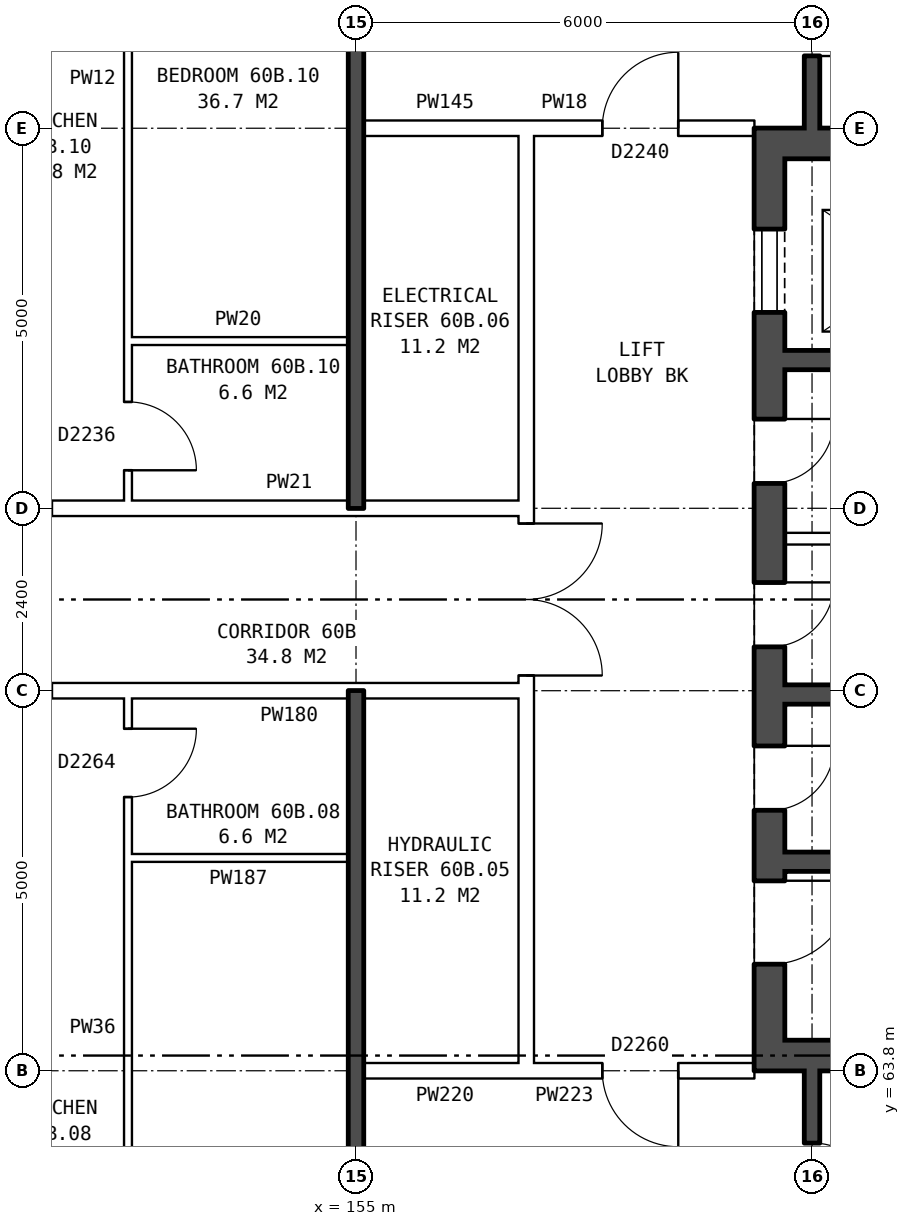
"""IFC4 building model, lengths in metres.
Left out: names, types, materials, properties, quantities, classifications, styles, units other than length and angle.
Written with IfcOpenShell. Run it as: python <this file> out.ifc"""

import sys

from ifc_helpers import new_model, si_unit, direction, frame, frame_2d, origin, place, context, subcontext, project, spatial, rectangle, extrude, element, fill, save


model = new_model("IFC4")
c1 = context("Model", 3, precision=1e-05, world=origin(), true_north=direction((0.0, 1.0)))
c2 = subcontext(c1, "Body", "Model", "MODEL_VIEW")
j1 = project(units=[si_unit("LENGTHUNIT", "METRE"), si_unit("PLANEANGLEUNIT", "RADIAN")], contexts=[c1])
p1 = place(None, origin())
s1 = spatial("IfcSite", under=j1, at=p1, CompositionType="ELEMENT")
p2 = place(p1, origin())
s2 = spatial("IfcBuilding", under=s1, at=p2, CompositionType="ELEMENT")
p3 = place(p2, frame((0.0, 0.0, 212.1)))
s3 = spatial("IfcBuildingStorey", under=s2, at=p3, CompositionType="ELEMENT", Elevation=212.1)
p4 = place(p3, frame((160.44, 76.2, 0.0), z_axis=(0.0, 0.0, 1.0), x_axis=(0.0, -1.0, 0.0)))
e1 = element("IfcWall", 1, at=p4, inside=s3, PredefinedType="SHEAR", context=c2, shape_type="SweptSolid", body=[
    extrude(rectangle(XDim=12.4, YDim=0.4, at=frame_2d((6.2, 0.0))), origin(), (0.0, 0.0, 1.0), 2.85),
])
p5 = place(p4, frame((1.325, 0.0, 0.0)))
e2 = element("IfcOpeningElement", 2, at=p5, cuts=e1, PredefinedType="OPENING", context=c2, shape_type="SweptSolid", body=[
    extrude(rectangle(XDim=1.1, YDim=2.1, at=frame_2d((0.55, 1.05))), frame((0.0, 0.21, 0.0), z_axis=(0.0, -1.0, 0.0), x_axis=(1.0, 0.0, 0.0)), (0.0, 0.0, 1.0), 0.42),
])
p6 = place(p4, frame((3.825, 0.0, 0.0)))
e3 = element("IfcOpeningElement", 3, at=p6, cuts=e1, PredefinedType="OPENING", context=c2, shape_type="SweptSolid", body=[
    extrude(rectangle(XDim=0.85, YDim=2.1, at=frame_2d((0.425, 1.05))), frame((0.0, 0.21, 0.0), z_axis=(0.0, -1.0, 0.0), x_axis=(1.0, 0.0, 0.0)), (0.0, 0.0, 1.0), 0.42),
])
p7 = place(p4, frame((5.975, 0.0, 0.0)))
e4 = element("IfcOpeningElement", 4, at=p7, cuts=e1, PredefinedType="OPENING", context=c2, shape_type="SweptSolid", body=[
    extrude(rectangle(XDim=0.85, YDim=2.1, at=frame_2d((0.425, 1.05))), frame((0.0, 0.21, 0.0), z_axis=(0.0, -1.0, 0.0), x_axis=(1.0, 0.0, 0.0)), (0.0, 0.0, 1.0), 0.42),
])
p8 = place(p4, frame((9.9, 0.0, 0.0)))
e5 = element("IfcOpeningElement", 5, at=p8, cuts=e1, PredefinedType="OPENING", context=c2, shape_type="SweptSolid", body=[
    extrude(rectangle(XDim=1.1, YDim=2.1, at=frame_2d((0.55, 1.05))), frame((0.0, 0.21, 0.0), z_axis=(0.0, -1.0, 0.0), x_axis=(1.0, 0.0, 0.0)), (0.0, 0.0, 1.0), 0.42),
])
p9 = place(p4, frame((8.125, 0.0, 0.0)))
e6 = element("IfcOpeningElement", 6, at=p9, cuts=e1, PredefinedType="OPENING", context=c2, shape_type="SweptSolid", body=[
    extrude(rectangle(XDim=0.85, YDim=2.1, at=frame_2d((0.425, 1.05))), frame((0.0, 0.21, 0.0), z_axis=(0.0, -1.0, 0.0), x_axis=(1.0, 0.0, 0.0)), (0.0, 0.0, 1.0), 0.42),
])
for number, where, z_axis, x_axis in (
    (7, (160.64, 76.0, 0.0), (0.0, 0.0, 1.0), (1.0, 0.0, 0.0)),
    (8, (160.64, 64.0, 0.0), (0.0, 0.0, 1.0), (1.0, 0.0, 0.0)),
):
    element("IfcWall", number, at=place(p3, frame(where, z_axis=z_axis, x_axis=x_axis)), inside=s3, PredefinedType="SHEAR", context=c2, shape_type="SweptSolid", body=[
        extrude(rectangle(XDim=7.6, YDim=0.4, at=frame_2d((3.8, 0.0))), origin(), (0.0, 0.0, 1.0), 2.85),
    ])
p10 = place(p3, frame((160.64, 73.15, 0.0), z_axis=(0.0, 0.0, 1.0), x_axis=(1.0, 0.0, 0.0)))
e9 = element("IfcWall", 9, at=p10, inside=s3, PredefinedType="SHEAR", context=c2, shape_type="SweptSolid", body=[
    extrude(rectangle(XDim=4.775, YDim=0.25, at=frame_2d((2.388, 0.0))), origin(), (0.0, 0.0, 1.0), 2.85),
])
p11 = place(p3, frame((160.64, 70.8, 0.0), z_axis=(0.0, 0.0, 1.0), x_axis=(1.0, 0.0, 0.0)))
e10 = element("IfcWall", 10, at=p11, inside=s3, PredefinedType="PARTITIONING", context=c2, shape_type="SweptSolid", body=[
    extrude(rectangle(XDim=2.525, YDim=0.15, at=frame_2d((1.263, 0.0))), origin(), (0.0, 0.0, 1.0), 2.85),
])
p12 = place(p3, frame((160.64, 68.75, 0.0), z_axis=(0.0, 0.0, 1.0), x_axis=(1.0, 0.0, 0.0)))
e11 = element("IfcWall", 11, at=p12, inside=s3, PredefinedType="SHEAR", context=c2, shape_type="SweptSolid", body=[
    extrude(rectangle(XDim=7.6, YDim=0.25, at=frame_2d((3.8, 0.0))), origin(), (0.0, 0.0, 1.0), 2.85),
])
p13 = place(p12, frame((5.175, 0.0, 0.0)))
e12 = element("IfcOpeningElement", 12, at=p13, cuts=e11, PredefinedType="OPENING", context=c2, shape_type="SweptSolid", body=[
    extrude(rectangle(XDim=1.1, YDim=2.1, at=frame_2d((0.55, 1.05))), frame((0.0, 0.135, 0.0), z_axis=(0.0, -1.0, 0.0), x_axis=(1.0, 0.0, 0.0)), (0.0, 0.0, 1.0), 0.27),
])
p14 = place(p12, frame((2.975, 0.0, 0.0)))
e13 = element("IfcOpeningElement", 13, at=p14, cuts=e11, PredefinedType="OPENING", context=c2, shape_type="SweptSolid", body=[
    extrude(rectangle(XDim=0.85, YDim=2.1, at=frame_2d((0.425, 1.05))), frame((0.0, 0.135, 0.0), z_axis=(0.0, -1.0, 0.0), x_axis=(1.0, 0.0, 0.0)), (0.0, 0.0, 1.0), 0.27),
])
p15 = place(p3, frame((160.64, 66.55, 0.0), z_axis=(0.0, 0.0, 1.0), x_axis=(1.0, 0.0, 0.0)))
e14 = element("IfcWall", 14, at=p15, inside=s3, PredefinedType="SHEAR", context=c2, shape_type="SweptSolid", body=[
    extrude(rectangle(XDim=2.525, YDim=0.25, at=frame_2d((1.263, 0.0))), origin(), (0.0, 0.0, 1.0), 2.85),
])
p16 = place(p3, frame((157.24, 63.9, 0.0), z_axis=(0.0, 0.0, 1.0), x_axis=(0.0, 1.0, 0.0)))
e15 = element("IfcWall", 15, at=p16, inside=s3, PredefinedType="PARTITIONING", context=c2, shape_type="SweptSolid", body=[
    extrude(rectangle(XDim=12.2, YDim=0.2, at=frame_2d((6.1, 0.0))), origin(), (0.0, 0.0, 1.0), 2.85),
])
p17 = place(p16, frame((5.1, 0.0, 0.0)))
e16 = element("IfcOpeningElement", 16, at=p17, cuts=e15, PredefinedType="OPENING", context=c2, shape_type="SweptSolid", body=[
    extrude(rectangle(XDim=2.0, YDim=2.1, at=frame_2d((1.0, 1.05))), frame((0.0, 0.11, 0.0), z_axis=(0.0, -1.0, 0.0), x_axis=(1.0, 0.0, 0.0)), (0.0, 0.0, 1.0), 0.22),
])
p18 = place(p3, frame((155.1, 63.8, 0.0), z_axis=(0.0, 0.0, 1.0), x_axis=(1.0, 0.0, 0.0)))
e17 = element("IfcWall", 17, at=p18, inside=s3, PredefinedType="PARTITIONING", context=c2, shape_type="SweptSolid", body=[
    extrude(rectangle(XDim=2.14, YDim=0.2, at=frame_2d((1.07, 0.0))), origin(), (0.0, 0.0, 1.0), 2.85),
])
p19 = place(p3, frame((157.24, 63.8, 0.0), z_axis=(0.0, 0.0, 1.0), x_axis=(1.0, 0.0, 0.0)))
e18 = element("IfcWall", 18, at=p19, inside=s3, PredefinedType="PARTITIONING", context=c2, shape_type="SweptSolid", body=[
    extrude(rectangle(XDim=3.0, YDim=0.2, at=frame_2d((1.5, 0.0))), origin(), (0.0, 0.0, 1.0), 2.85),
])
p20 = place(p19, frame((1.0, 0.0, 0.0)))
e19 = element("IfcOpeningElement", 19, at=p20, cuts=e18, PredefinedType="OPENING", context=c2, shape_type="SweptSolid", body=[
    extrude(rectangle(XDim=1.0, YDim=2.1, at=frame_2d((0.5, 1.05))), frame((0.0, 0.11, 0.0), z_axis=(0.0, -1.0, 0.0), x_axis=(1.0, 0.0, 0.0)), (0.0, 0.0, 1.0), 0.22),
])
p21 = place(p3, frame((152.0, 66.6, 0.0), z_axis=(0.0, 0.0, 1.0), x_axis=(1.0, 0.0, 0.0)))
e20 = element("IfcWall", 20, at=p21, inside=s3, PredefinedType="PARTITIONING", context=c2, shape_type="SweptSolid", body=[
    extrude(rectangle(XDim=2.9, YDim=0.1, at=frame_2d((1.45, 0.0))), origin(), (0.0, 0.0, 1.0), 2.85),
])
p22 = place(p3, frame((142.76, 68.8, 0.0), z_axis=(0.0, 0.0, 1.0), x_axis=(1.0, 0.0, 0.0)))
e21 = element("IfcWall", 21, at=p22, inside=s3, PredefinedType="PARTITIONING", context=c2, shape_type="SweptSolid", body=[
    extrude(rectangle(XDim=14.48, YDim=0.2, at=frame_2d((7.24, 0.0))), origin(), (0.0, 0.0, 1.0), 2.85),
])
p23 = place(p22, frame((4.24, 0.0, 0.0)))
e22 = element("IfcOpeningElement", 22, at=p23, cuts=e21, PredefinedType="OPENING", context=c2, shape_type="SweptSolid", body=[
    extrude(rectangle(XDim=1.0, YDim=2.1, at=frame_2d((0.5, 1.05))), frame((0.0, 0.11, 0.0), z_axis=(0.0, -1.0, 0.0), x_axis=(1.0, 0.0, 0.0)), (0.0, 0.0, 1.0), 0.22),
])
p24 = place(p22, frame((7.24, 0.0, 0.0)))
e23 = element("IfcOpeningElement", 23, at=p24, cuts=e21, PredefinedType="OPENING", context=c2, shape_type="SweptSolid", body=[
    extrude(rectangle(XDim=1.0, YDim=2.1, at=frame_2d((0.5, 1.05))), frame((0.0, 0.11, 0.0), z_axis=(0.0, -1.0, 0.0), x_axis=(1.0, 0.0, 0.0)), (0.0, 0.0, 1.0), 0.22),
])
p25 = place(p3, frame((142.76, 71.2, 0.0), z_axis=(0.0, 0.0, 1.0), x_axis=(1.0, 0.0, 0.0)))
e24 = element("IfcWall", 24, at=p25, inside=s3, PredefinedType="PARTITIONING", context=c2, shape_type="SweptSolid", body=[
    extrude(rectangle(XDim=14.48, YDim=0.2, at=frame_2d((7.24, 0.0))), origin(), (0.0, 0.0, 1.0), 2.85),
])
p26 = place(p25, frame((4.24, 0.0, 0.0)))
e25 = element("IfcOpeningElement", 25, at=p26, cuts=e24, PredefinedType="OPENING", context=c2, shape_type="SweptSolid", body=[
    extrude(rectangle(XDim=1.0, YDim=2.1, at=frame_2d((0.5, 1.05))), frame((0.0, 0.11, 0.0), z_axis=(0.0, -1.0, 0.0), x_axis=(1.0, 0.0, 0.0)), (0.0, 0.0, 1.0), 0.22),
])
p27 = place(p25, frame((7.24, 0.0, 0.0)))
e26 = element("IfcOpeningElement", 26, at=p27, cuts=e24, PredefinedType="OPENING", context=c2, shape_type="SweptSolid", body=[
    extrude(rectangle(XDim=1.0, YDim=2.1, at=frame_2d((0.5, 1.05))), frame((0.0, 0.11, 0.0), z_axis=(0.0, -1.0, 0.0), x_axis=(1.0, 0.0, 0.0)), (0.0, 0.0, 1.0), 0.22),
])
p28 = place(p3, frame((152.0, 73.4, 0.0), z_axis=(0.0, 0.0, 1.0), x_axis=(1.0, 0.0, 0.0)))
e27 = element("IfcWall", 27, at=p28, inside=s3, PredefinedType="PARTITIONING", context=c2, shape_type="SweptSolid", body=[
    extrude(rectangle(XDim=2.9, YDim=0.1, at=frame_2d((1.45, 0.0))), origin(), (0.0, 0.0, 1.0), 2.85),
])
p29 = place(p3, frame((155.1, 76.2, 0.0), z_axis=(0.0, 0.0, 1.0), x_axis=(1.0, 0.0, 0.0)))
e28 = element("IfcWall", 28, at=p29, inside=s3, PredefinedType="PARTITIONING", context=c2, shape_type="SweptSolid", body=[
    extrude(rectangle(XDim=2.14, YDim=0.2, at=frame_2d((1.07, 0.0))), origin(), (0.0, 0.0, 1.0), 2.85),
])
p30 = place(p3, frame((157.24, 76.2, 0.0), z_axis=(0.0, 0.0, 1.0), x_axis=(1.0, 0.0, 0.0)))
e29 = element("IfcWall", 29, at=p30, inside=s3, PredefinedType="PARTITIONING", context=c2, shape_type="SweptSolid", body=[
    extrude(rectangle(XDim=3.0, YDim=0.2, at=frame_2d((1.5, 0.0))), origin(), (0.0, 0.0, 1.0), 2.85),
])
p31 = place(p30, frame((1.0, 0.0, 0.0)))
e30 = element("IfcOpeningElement", 30, at=p31, cuts=e29, PredefinedType="OPENING", context=c2, shape_type="SweptSolid", body=[
    extrude(rectangle(XDim=1.0, YDim=2.1, at=frame_2d((0.5, 1.05))), frame((0.0, 0.11, 0.0), z_axis=(0.0, -1.0, 0.0), x_axis=(1.0, 0.0, 0.0)), (0.0, 0.0, 1.0), 0.22),
])
p32 = place(p3, frame((152.0, 54.36, 0.0), z_axis=(0.0, 0.0, 1.0), x_axis=(0.0, 1.0, 0.0)))
e31 = element("IfcWall", 31, at=p32, inside=s3, PredefinedType="PARTITIONING", context=c2, shape_type="SweptSolid", body=[
    extrude(rectangle(XDim=14.34, YDim=0.1, at=frame_2d((7.17, 0.0))), origin(), (0.0, 0.0, 1.0), 2.85),
])
p33 = place(p32, frame((5.5, 0.0, 0.0)))
e32 = element("IfcOpeningElement", 32, at=p33, cuts=e31, PredefinedType="OPENING", context=c2, shape_type="SweptSolid", body=[
    extrude(rectangle(XDim=0.9, YDim=2.1, at=frame_2d((0.45, 1.05))), frame((0.0, 0.06, 0.0), z_axis=(0.0, -1.0, 0.0), x_axis=(1.0, 0.0, 0.0)), (0.0, 0.0, 1.0), 0.12),
])
p34 = place(p32, frame((13.04, 0.0, 0.0)))
e33 = element("IfcOpeningElement", 33, at=p34, cuts=e31, PredefinedType="OPENING", context=c2, shape_type="SweptSolid", body=[
    extrude(rectangle(XDim=0.9, YDim=2.1, at=frame_2d((0.45, 1.05))), frame((0.0, 0.06, 0.0), z_axis=(0.0, -1.0, 0.0), x_axis=(1.0, 0.0, 0.0)), (0.0, 0.0, 1.0), 0.12),
])
p35 = place(p3, frame((152.0, 71.3, 0.0), z_axis=(0.0, 0.0, 1.0), x_axis=(0.0, 1.0, 0.0)))
e34 = element("IfcWall", 34, at=p35, inside=s3, PredefinedType="PARTITIONING", context=c2, shape_type="SweptSolid", body=[
    extrude(rectangle(XDim=14.34, YDim=0.1, at=frame_2d((7.17, 0.0))), origin(), (0.0, 0.0, 1.0), 2.85),
])
p36 = place(p35, frame((9.24, 0.0, 0.0)))
e35 = element("IfcOpeningElement", 35, at=p36, cuts=e34, PredefinedType="OPENING", context=c2, shape_type="SweptSolid", body=[
    extrude(rectangle(XDim=0.9, YDim=2.1, at=frame_2d((0.45, 1.05))), frame((0.0, 0.06, 0.0), z_axis=(0.0, -1.0, 0.0), x_axis=(1.0, 0.0, 0.0)), (0.0, 0.0, 1.0), 0.12),
])
p37 = place(p35, frame((0.4, 0.0, 0.0)))
e36 = element("IfcOpeningElement", 36, at=p37, cuts=e34, PredefinedType="OPENING", context=c2, shape_type="SweptSolid", body=[
    extrude(rectangle(XDim=0.9, YDim=2.1, at=frame_2d((0.45, 1.05))), frame((0.0, 0.06, 0.0), z_axis=(0.0, -1.0, 0.0), x_axis=(1.0, 0.0, 0.0)), (0.0, 0.0, 1.0), 0.12),
])
for number, where, z_axis, x_axis in (
    (37, (155.0, 54.36, 0.0), (0.0, 0.0, 1.0), (0.0, 1.0, 0.0)),
    (38, (155.0, 71.2, 0.0), (0.0, 0.0, 1.0), (0.0, 1.0, 0.0)),
):
    element("IfcWall", number, at=place(p3, frame(where, z_axis=z_axis, x_axis=x_axis)), inside=s3, PredefinedType="SOLIDWALL", context=c2, shape_type="SweptSolid", body=[
        extrude(rectangle(XDim=14.44, YDim=0.2, at=frame_2d((7.22, 0.0))), origin(), (0.0, 0.0, 1.0), 2.85),
    ])
p38 = place(p3, frame((161.0, 54.36, 0.0), z_axis=(0.0, 0.0, 1.0), x_axis=(0.0, 1.0, 0.0)))
e39 = element("IfcWall", 39, at=p38, inside=s3, PredefinedType="SOLIDWALL", context=c2, shape_type="SweptSolid", body=[
    extrude(rectangle(XDim=9.44, YDim=0.2, at=frame_2d((4.72, 0.0))), origin(), (0.0, 0.0, 1.0), 2.85),
])
p39 = place(p38, frame((1.37, 0.0, 0.0)))
e40 = element("IfcOpeningElement", 40, at=p39, cuts=e39, PredefinedType="OPENING", context=c2, shape_type="SweptSolid", body=[
    extrude(rectangle(XDim=0.9, YDim=2.1, at=frame_2d((0.45, 1.05))), frame((0.0, 0.11, 0.0), z_axis=(0.0, -1.0, 0.0), x_axis=(1.0, 0.0, 0.0)), (0.0, 0.0, 1.0), 0.22),
])
p40 = place(p38, frame((4.29, 0.0, 0.0)))
e41 = element("IfcOpeningElement", 41, at=p40, cuts=e39, PredefinedType="OPENING", context=c2, shape_type="SweptSolid", body=[
    extrude(rectangle(XDim=0.9, YDim=2.1, at=frame_2d((0.45, 1.05))), frame((0.0, 0.11, 0.0), z_axis=(0.0, -1.0, 0.0), x_axis=(1.0, 0.0, 0.0)), (0.0, 0.0, 1.0), 0.22),
])
p41 = place(p38, frame((7.59, 0.0, 0.0)))
e42 = element("IfcOpeningElement", 42, at=p41, cuts=e39, PredefinedType="OPENING", context=c2, shape_type="SweptSolid", body=[
    extrude(rectangle(XDim=0.9, YDim=2.1, at=frame_2d((0.45, 1.05))), frame((0.0, 0.11, 0.0), z_axis=(0.0, -1.0, 0.0), x_axis=(1.0, 0.0, 0.0)), (0.0, 0.0, 1.0), 0.22),
])
p42 = place(p3, frame((161.0, 76.2, 0.0), z_axis=(0.0, 0.0, 1.0), x_axis=(0.0, 1.0, 0.0)))
e43 = element("IfcWall", 43, at=p42, inside=s3, PredefinedType="SOLIDWALL", context=c2, shape_type="SweptSolid", body=[
    extrude(rectangle(XDim=9.44, YDim=0.2, at=frame_2d((4.72, 0.0))), origin(), (0.0, 0.0, 1.0), 2.85),
])
p43 = place(p42, frame((7.17, 0.0, 0.0)))
e44 = element("IfcOpeningElement", 44, at=p43, cuts=e43, PredefinedType="OPENING", context=c2, shape_type="SweptSolid", body=[
    extrude(rectangle(XDim=0.9, YDim=2.1, at=frame_2d((0.45, 1.05))), frame((0.0, 0.11, 0.0), z_axis=(0.0, -1.0, 0.0), x_axis=(1.0, 0.0, 0.0)), (0.0, 0.0, 1.0), 0.22),
])
p44 = place(p42, frame((4.4, 0.0, 0.0)))
e45 = element("IfcOpeningElement", 45, at=p44, cuts=e43, PredefinedType="OPENING", context=c2, shape_type="SweptSolid", body=[
    extrude(rectangle(XDim=0.9, YDim=2.1, at=frame_2d((0.45, 1.05))), frame((0.0, 0.11, 0.0), z_axis=(0.0, -1.0, 0.0), x_axis=(1.0, 0.0, 0.0)), (0.0, 0.0, 1.0), 0.22),
])
p45 = place(p42, frame((0.95, 0.0, 0.0)))
e46 = element("IfcOpeningElement", 46, at=p45, cuts=e43, PredefinedType="OPENING", context=c2, shape_type="SweptSolid", body=[
    extrude(rectangle(XDim=0.9, YDim=2.1, at=frame_2d((0.45, 1.05))), frame((0.0, 0.11, 0.0), z_axis=(0.0, -1.0, 0.0), x_axis=(1.0, 0.0, 0.0)), (0.0, 0.0, 1.0), 0.22),
])
p46 = place(p5, origin())
e47 = element("IfcDoor", 47, at=p46, inside=s3, OperationType="DOUBLE_DOOR_SLIDING", PredefinedType="DOOR", context=c2, shape_type="SweptSolid", body=[
    extrude(rectangle(XDim=1.1, YDim=2.1, at=frame_2d((0.55, 1.05))), frame((0.0, 0.185, 0.0), z_axis=(0.0, -1.0, 0.0), x_axis=(1.0, 0.0, 0.0)), (0.0, 0.0, 1.0), 0.05),
])
fill(e2, e47)
p47 = place(p6, origin())
e48 = element("IfcDoor", 48, at=p47, inside=s3, OperationType="SINGLE_SWING_LEFT", PredefinedType="DOOR", context=c2, shape_type="SweptSolid", body=[
    extrude(rectangle(XDim=0.85, YDim=2.1, at=frame_2d((0.425, 1.05))), frame((0.0, 0.185, 0.0), z_axis=(0.0, -1.0, 0.0), x_axis=(1.0, 0.0, 0.0)), (0.0, 0.0, 1.0), 0.05),
])
fill(e3, e48)
p48 = place(p7, origin())
e49 = element("IfcDoor", 49, at=p48, inside=s3, OperationType="SINGLE_SWING_LEFT", PredefinedType="DOOR", context=c2, shape_type="SweptSolid", body=[
    extrude(rectangle(XDim=0.85, YDim=2.1, at=frame_2d((0.425, 1.05))), frame((0.0, 0.185, 0.0), z_axis=(0.0, -1.0, 0.0), x_axis=(1.0, 0.0, 0.0)), (0.0, 0.0, 1.0), 0.05),
])
fill(e4, e49)
p49 = place(p8, origin())
e50 = element("IfcDoor", 50, at=p49, inside=s3, OperationType="SINGLE_SWING_LEFT", PredefinedType="DOOR", context=c2, shape_type="SweptSolid", body=[
    extrude(rectangle(XDim=1.1, YDim=2.1, at=frame_2d((0.55, 1.05))), frame((0.0, 0.185, 0.0), z_axis=(0.0, -1.0, 0.0), x_axis=(1.0, 0.0, 0.0)), (0.0, 0.0, 1.0), 0.05),
])
fill(e5, e50)
p50 = place(p9, origin())
e51 = element("IfcDoor", 51, at=p50, inside=s3, OperationType="SINGLE_SWING_LEFT", PredefinedType="DOOR", context=c2, shape_type="SweptSolid", body=[
    extrude(rectangle(XDim=0.85, YDim=2.1, at=frame_2d((0.425, 1.05))), frame((0.0, 0.185, 0.0), z_axis=(0.0, -1.0, 0.0), x_axis=(1.0, 0.0, 0.0)), (0.0, 0.0, 1.0), 0.05),
])
fill(e6, e51)
p51 = place(p17, frame((2.0, 0.0, 0.0), z_axis=(0.0, 0.0, 1.0), x_axis=(-1.0, 0.0, 0.0)))
e52 = element("IfcDoor", 52, at=p51, inside=s3, OperationType="DOUBLE_DOOR_SINGLE_SWING", PredefinedType="DOOR", context=c2, shape_type="SweptSolid", body=[
    extrude(rectangle(XDim=2.0, YDim=2.1, at=frame_2d((1.0, 1.05))), frame((0.0, 0.025, 0.0), z_axis=(0.0, -1.0, 0.0), x_axis=(1.0, 0.0, 0.0)), (0.0, 0.0, 1.0), 0.05),
])
fill(e16, e52)
p52 = place(p41, frame((0.9, 0.0, 0.0), z_axis=(0.0, 0.0, 1.0), x_axis=(-1.0, 0.0, 0.0)))
e53 = element("IfcDoor", 53, at=p52, inside=s3, OperationType="SINGLE_SWING_RIGHT", PredefinedType="DOOR", context=c2, shape_type="SweptSolid", body=[
    extrude(rectangle(XDim=0.9, YDim=2.1, at=frame_2d((0.45, 1.05))), frame((0.0, 0.025, 0.0), z_axis=(0.0, -1.0, 0.0), x_axis=(1.0, 0.0, 0.0)), (0.0, 0.0, 1.0), 0.05),
])
fill(e42, e53)
p53 = place(p20, frame((1.0, 0.0, 0.0), z_axis=(0.0, 0.0, 1.0), x_axis=(-1.0, 0.0, 0.0)))
e54 = element("IfcDoor", 54, at=p53, inside=s3, OperationType="SINGLE_SWING_LEFT", PredefinedType="DOOR", context=c2, shape_type="SweptSolid", body=[
    extrude(rectangle(XDim=1.0, YDim=2.1, at=frame_2d((0.5, 1.05))), frame((0.0, 0.025, 0.0), z_axis=(0.0, -1.0, 0.0), x_axis=(1.0, 0.0, 0.0)), (0.0, 0.0, 1.0), 0.05),
])
fill(e19, e54)
p54 = place(p45, frame((0.9, 0.0, 0.0), z_axis=(0.0, 0.0, 1.0), x_axis=(-1.0, 0.0, 0.0)))
e55 = element("IfcDoor", 55, at=p54, inside=s3, OperationType="SINGLE_SWING_RIGHT", PredefinedType="DOOR", context=c2, shape_type="SweptSolid", body=[
    extrude(rectangle(XDim=0.9, YDim=2.1, at=frame_2d((0.45, 1.05))), frame((0.0, 0.025, 0.0), z_axis=(0.0, -1.0, 0.0), x_axis=(1.0, 0.0, 0.0)), (0.0, 0.0, 1.0), 0.05),
])
fill(e46, e55)
p55 = place(p31, origin())
e56 = element("IfcDoor", 56, at=p55, inside=s3, OperationType="SINGLE_SWING_RIGHT", PredefinedType="DOOR", context=c2, shape_type="SweptSolid", body=[
    extrude(rectangle(XDim=1.0, YDim=2.1, at=frame_2d((0.5, 1.05))), frame((0.0, 0.025, 0.0), z_axis=(0.0, -1.0, 0.0), x_axis=(1.0, 0.0, 0.0)), (0.0, 0.0, 1.0), 0.05),
])
fill(e30, e56)
p56 = place(p34, frame((0.9, 0.0, 0.0), z_axis=(0.0, 0.0, 1.0), x_axis=(-1.0, 0.0, 0.0)))
e57 = element("IfcDoor", 57, at=p56, inside=s3, OperationType="SINGLE_SWING_LEFT", PredefinedType="DOOR", context=c2, shape_type="SweptSolid", body=[
    extrude(rectangle(XDim=0.9, YDim=2.1, at=frame_2d((0.45, 1.05))), frame((0.0, 0.025, 0.0), z_axis=(0.0, -1.0, 0.0), x_axis=(1.0, 0.0, 0.0)), (0.0, 0.0, 1.0), 0.05),
])
fill(e33, e57)
p57 = place(p37, frame((0.9, 0.0, 0.0), z_axis=(0.0, 0.0, 1.0), x_axis=(-1.0, 0.0, 0.0)))
e58 = element("IfcDoor", 58, at=p57, inside=s3, OperationType="SINGLE_SWING_RIGHT", PredefinedType="DOOR", context=c2, shape_type="SweptSolid", body=[
    extrude(rectangle(XDim=0.9, YDim=2.1, at=frame_2d((0.45, 1.05))), frame((0.0, 0.025, 0.0), z_axis=(0.0, -1.0, 0.0), x_axis=(1.0, 0.0, 0.0)), (0.0, 0.0, 1.0), 0.05),
])
fill(e36, e58)
save(model, sys.argv[1])
